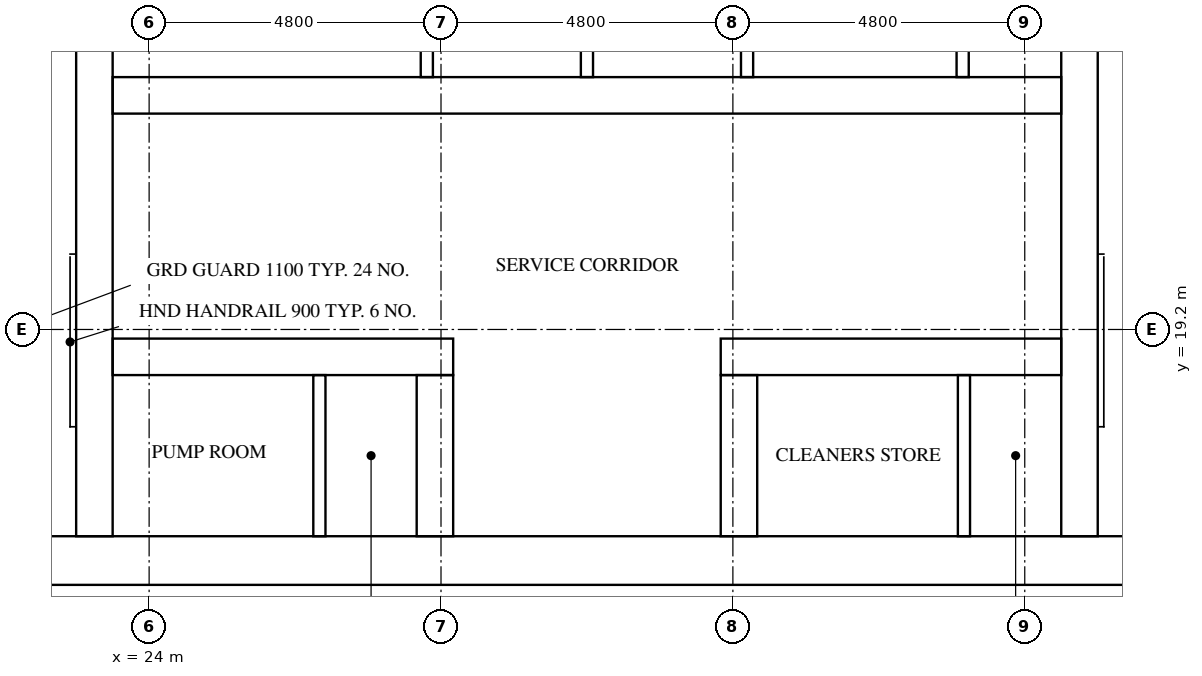
"""IFC4 building model, lengths in metres.
Left out: names, types, materials, properties, quantities, classifications, styles, units other than length and angle.
Written with IfcOpenShell. Run it as: python <this file> out.ifc"""

import sys

from ifc_helpers import new_model, si_unit, direction, frame, frame_2d, origin, place, context, subcontext, project, spatial, rectangle, extrude, element, fill, save


model = new_model("IFC4")
c1 = context("Model", 3, precision=1e-05, world=origin(), true_north=direction((0.0, 1.0)))
c2 = subcontext(c1, "Body", "Model", "MODEL_VIEW")
j1 = project(units=[si_unit("LENGTHUNIT", "METRE"), si_unit("PLANEANGLEUNIT", "RADIAN")], contexts=[c1])
p1 = place(None, origin())
s1 = spatial("IfcSite", under=j1, at=p1, CompositionType="ELEMENT")
p2 = place(p1, origin())
s2 = spatial("IfcBuilding", under=s1, at=p2, CompositionType="ELEMENT")
p3 = place(p2, frame((0.0, 0.0, 170.0)))
s3 = spatial("IfcBuildingStorey", under=s2, at=p3, CompositionType="ELEMENT", Elevation=170.0)
p4 = place(p3, frame((15.0, 15.4, 0.0), z_axis=(0.0, 0.0, 1.0), x_axis=(1.0, 0.0, 0.0)))
e1 = element("IfcWall", 1, at=p4, inside=s3, PredefinedType="SHEAR", context=c2, shape_type="SweptSolid", body=[
    extrude(rectangle(XDim=32.4, YDim=0.8, at=frame_2d((16.2, 0.0))), origin(), (0.0, 0.0, 1.0), 3.1),
])
p5 = place(p4, frame((15.3, 0.0, 0.0)))
e2 = element("IfcOpeningElement", 2, at=p5, cuts=e1, PredefinedType="OPENING", context=c2, shape_type="SweptSolid", body=[
    extrude(rectangle(XDim=1.8, YDim=2.1, at=frame_2d((0.9, 1.05))), frame((0.0, 0.41, 0.0), z_axis=(0.0, -1.0, 0.0), x_axis=(1.0, 0.0, 0.0)), (0.0, 0.0, 1.0), 0.82),
])
p6 = place(p3, frame((23.1, 15.8, 0.0), z_axis=(0.0, 0.0, 1.0), x_axis=(0.0, 1.0, 0.0)))
e3 = element("IfcWall", 3, at=p6, inside=s3, PredefinedType="SHEAR", context=c2, shape_type="SweptSolid", body=[
    extrude(rectangle(XDim=21.2, YDim=0.6, at=frame_2d((10.6, 0.0))), origin(), (0.0, 0.0, 1.0), 3.1),
])
p7 = place(p3, frame((39.3, 15.8, 0.0), z_axis=(0.0, 0.0, 1.0), x_axis=(0.0, 1.0, 0.0)))
e4 = element("IfcWall", 4, at=p7, inside=s3, PredefinedType="SHEAR", context=c2, shape_type="SweptSolid", body=[
    extrude(rectangle(XDim=8.45, YDim=0.6, at=frame_2d((4.225, 0.0))), origin(), (0.0, 0.0, 1.0), 3.1),
])
p8 = place(p3, frame((23.4, 18.75, 0.0), z_axis=(0.0, 0.0, 1.0), x_axis=(1.0, 0.0, 0.0)))
e5 = element("IfcWall", 5, at=p8, inside=s3, PredefinedType="SHEAR", context=c2, shape_type="SweptSolid", body=[
    extrude(rectangle(XDim=5.6, YDim=0.6, at=frame_2d((2.8, 0.0))), origin(), (0.0, 0.0, 1.0), 3.1),
])
p9 = place(p8, frame((1.15, 0.0, 0.0)))
e6 = element("IfcOpeningElement", 6, at=p9, cuts=e5, PredefinedType="OPENING", context=c2, shape_type="SweptSolid", body=[
    extrude(rectangle(XDim=1.0, YDim=2.1, at=frame_2d((0.5, 1.05))), frame((0.0, 0.31, 0.0), z_axis=(0.0, -1.0, 0.0), x_axis=(1.0, 0.0, 0.0)), (0.0, 0.0, 1.0), 0.62),
])
p10 = place(p8, frame((3.75, 0.0, 0.0)))
e7 = element("IfcOpeningElement", 7, at=p10, cuts=e5, PredefinedType="OPENING", context=c2, shape_type="SweptSolid", body=[
    extrude(rectangle(XDim=1.0, YDim=2.1, at=frame_2d((0.5, 1.05))), frame((0.0, 0.31, 0.0), z_axis=(0.0, -1.0, 0.0), x_axis=(1.0, 0.0, 0.0)), (0.0, 0.0, 1.0), 0.62),
])
p11 = place(p3, frame((33.4, 18.75, 0.0), z_axis=(0.0, 0.0, 1.0), x_axis=(1.0, 0.0, 0.0)))
e8 = element("IfcWall", 8, at=p11, inside=s3, PredefinedType="SHEAR", context=c2, shape_type="SweptSolid", body=[
    extrude(rectangle(XDim=5.6, YDim=0.6, at=frame_2d((2.8, 0.0))), origin(), (0.0, 0.0, 1.0), 3.1),
])
p12 = place(p11, frame((1.75, 0.0, 0.0)))
e9 = element("IfcOpeningElement", 9, at=p12, cuts=e8, PredefinedType="OPENING", context=c2, shape_type="SweptSolid", body=[
    extrude(rectangle(XDim=1.0, YDim=2.1, at=frame_2d((0.5, 1.05))), frame((0.0, 0.31, 0.0), z_axis=(0.0, -1.0, 0.0), x_axis=(1.0, 0.0, 0.0)), (0.0, 0.0, 1.0), 0.62),
])
p13 = place(p11, frame((4.35, 0.0, 0.0)))
e10 = element("IfcOpeningElement", 10, at=p13, cuts=e8, PredefinedType="OPENING", context=c2, shape_type="SweptSolid", body=[
    extrude(rectangle(XDim=1.0, YDim=2.1, at=frame_2d((0.5, 1.05))), frame((0.0, 0.31, 0.0), z_axis=(0.0, -1.0, 0.0), x_axis=(1.0, 0.0, 0.0)), (0.0, 0.0, 1.0), 0.62),
])
p14 = place(p3, frame((23.4, 23.05, 0.0), z_axis=(0.0, 0.0, 1.0), x_axis=(1.0, 0.0, 0.0)))
e11 = element("IfcWall", 11, at=p14, inside=s3, PredefinedType="SHEAR", context=c2, shape_type="SweptSolid", body=[
    extrude(rectangle(XDim=15.6, YDim=0.6, at=frame_2d((7.8, 0.0))), origin(), (0.0, 0.0, 1.0), 3.1),
])
p15 = place(p14, frame((2.033, 0.0, 0.0)))
e12 = element("IfcOpeningElement", 12, at=p15, cuts=e11, PredefinedType="OPENING", context=c2, shape_type="SweptSolid", body=[
    extrude(rectangle(XDim=1.0, YDim=2.1, at=frame_2d((0.5, 1.05))), frame((0.0, 0.31, 0.0), z_axis=(0.0, -1.0, 0.0), x_axis=(1.0, 0.0, 0.0)), (0.0, 0.0, 1.0), 0.62),
])
p16 = place(p14, frame((11.706, 0.0, 0.0)))
e13 = element("IfcOpeningElement", 13, at=p16, cuts=e11, PredefinedType="OPENING", context=c2, shape_type="SweptSolid", body=[
    extrude(rectangle(XDim=1.0, YDim=2.1, at=frame_2d((0.5, 1.05))), frame((0.0, 0.31, 0.0), z_axis=(0.0, -1.0, 0.0), x_axis=(1.0, 0.0, 0.0)), (0.0, 0.0, 1.0), 0.62),
])
p17 = place(p14, frame((14.339, 0.0, 0.0)))
e14 = element("IfcOpeningElement", 14, at=p17, cuts=e11, PredefinedType="OPENING", context=c2, shape_type="SweptSolid", body=[
    extrude(rectangle(XDim=1.0, YDim=2.1, at=frame_2d((0.5, 1.05))), frame((0.0, 0.31, 0.0), z_axis=(0.0, -1.0, 0.0), x_axis=(1.0, 0.0, 0.0)), (0.0, 0.0, 1.0), 0.62),
])
for number, where, z_axis, x_axis in (
    (15, (28.7, 15.8, 0.0), (0.0, 0.0, 1.0), (0.0, 1.0, 0.0)),
    (16, (33.7, 15.8, 0.0), (0.0, 0.0, 1.0), (0.0, 1.0, 0.0)),
):
    element("IfcWall", number, at=place(p3, frame(where, z_axis=z_axis, x_axis=x_axis)), inside=s3, PredefinedType="SHEAR", context=c2, shape_type="SweptSolid", body=[
        extrude(rectangle(XDim=2.65, YDim=0.6, at=frame_2d((1.325, 0.0))), origin(), (0.0, 0.0, 1.0), 3.1),
    ])
for number, where, z_axis, x_axis in (
    (17, (28.567, 23.35, 0.0), (0.0, 0.0, 1.0), (0.0, 1.0, 0.0)),
    (18, (31.2, 23.35, 0.0), (0.0, 0.0, 1.0), (0.0, 1.0, 0.0)),
    (19, (33.833, 23.35, 0.0), (0.0, 0.0, 1.0), (0.0, 1.0, 0.0)),
):
    element("IfcWall", number, at=place(p3, frame(where, z_axis=z_axis, x_axis=x_axis)), inside=s3, PredefinedType="SOLIDWALL", context=c2, shape_type="SweptSolid", body=[
        extrude(rectangle(XDim=2.5, YDim=0.2, at=frame_2d((1.25, 0.0))), origin(), (0.0, 0.0, 1.0), 3.1),
    ])
p18 = place(p3, frame((37.379, 23.35, 0.0), z_axis=(0.0, 0.0, 1.0), x_axis=(0.0, 1.0, 0.0)))
e20 = element("IfcWall", 20, at=p18, inside=s3, PredefinedType="PARTITIONING", context=c2, shape_type="SweptSolid", body=[
    extrude(rectangle(XDim=2.5, YDim=0.2, at=frame_2d((1.25, 0.0))), origin(), (0.0, 0.0, 1.0), 3.1),
])
for number, where, z_axis, x_axis in (
    (21, (26.8, 15.8, 0.0), (0.0, 0.0, 1.0), (0.0, 1.0, 0.0)),
    (22, (37.4, 15.8, 0.0), (0.0, 0.0, 1.0), (0.0, 1.0, 0.0)),
):
    element("IfcWall", number, at=place(p3, frame(where, z_axis=z_axis, x_axis=x_axis)), inside=s3, PredefinedType="PARTITIONING", context=c2, shape_type="SweptSolid", body=[
        extrude(rectangle(XDim=2.65, YDim=0.2, at=frame_2d((1.325, 0.0))), origin(), (0.0, 0.0, 1.0), 3.1),
    ])
p19 = place(p5, frame((1.8, 0.0, 0.0), z_axis=(0.0, 0.0, 1.0), x_axis=(-1.0, 0.0, 0.0)))
e23 = element("IfcDoor", 23, at=p19, inside=s3, OperationType="DOUBLE_DOOR_SINGLE_SWING", PredefinedType="DOOR", context=c2, shape_type="SweptSolid", body=[
    extrude(rectangle(XDim=1.8, YDim=2.1, at=frame_2d((0.9, 1.05))), frame((0.0, 0.025, 0.0), z_axis=(0.0, -1.0, 0.0), x_axis=(1.0, 0.0, 0.0)), (0.0, 0.0, 1.0), 0.05),
])
fill(e2, e23)
p20 = place(p15, frame((1.0, 0.0, 0.0), z_axis=(0.0, 0.0, 1.0), x_axis=(-1.0, 0.0, 0.0)))
e24 = element("IfcDoor", 24, at=p20, inside=s3, OperationType="SINGLE_SWING_LEFT", PredefinedType="DOOR", context=c2, shape_type="SweptSolid", body=[
    extrude(rectangle(XDim=1.0, YDim=2.1, at=frame_2d((0.5, 1.05))), frame((0.0, 0.025, 0.0), z_axis=(0.0, -1.0, 0.0), x_axis=(1.0, 0.0, 0.0)), (0.0, 0.0, 1.0), 0.05),
])
fill(e12, e24)
p21 = place(p16, frame((1.0, 0.0, 0.0), z_axis=(0.0, 0.0, 1.0), x_axis=(-1.0, 0.0, 0.0)))
e25 = element("IfcDoor", 25, at=p21, inside=s3, OperationType="SINGLE_SWING_RIGHT", PredefinedType="DOOR", context=c2, shape_type="SweptSolid", body=[
    extrude(rectangle(XDim=1.0, YDim=2.1, at=frame_2d((0.5, 1.05))), frame((0.0, 0.025, 0.0), z_axis=(0.0, -1.0, 0.0), x_axis=(1.0, 0.0, 0.0)), (0.0, 0.0, 1.0), 0.05),
])
fill(e13, e25)
p22 = place(p17, frame((1.0, 0.0, 0.0), z_axis=(0.0, 0.0, 1.0), x_axis=(-1.0, 0.0, 0.0)))
e26 = element("IfcDoor", 26, at=p22, inside=s3, OperationType="SINGLE_SWING_LEFT", PredefinedType="DOOR", context=c2, shape_type="SweptSolid", body=[
    extrude(rectangle(XDim=1.0, YDim=2.1, at=frame_2d((0.5, 1.05))), frame((0.0, 0.025, 0.0), z_axis=(0.0, -1.0, 0.0), x_axis=(1.0, 0.0, 0.0)), (0.0, 0.0, 1.0), 0.05),
])
fill(e14, e26)
p23 = place(p9, origin())
e27 = element("IfcDoor", 27, at=p23, inside=s3, OperationType="SINGLE_SWING_RIGHT", PredefinedType="DOOR", context=c2, shape_type="SweptSolid", body=[
    extrude(rectangle(XDim=1.0, YDim=2.1, at=frame_2d((0.5, 1.05))), frame((0.0, 0.025, 0.0), z_axis=(0.0, -1.0, 0.0), x_axis=(1.0, 0.0, 0.0)), (0.0, 0.0, 1.0), 0.05),
])
fill(e6, e27)
p24 = place(p10, origin())
e28 = element("IfcDoor", 28, at=p24, inside=s3, OperationType="SINGLE_SWING_LEFT", PredefinedType="DOOR", context=c2, shape_type="SweptSolid", body=[
    extrude(rectangle(XDim=1.0, YDim=2.1, at=frame_2d((0.5, 1.05))), frame((0.0, 0.025, 0.0), z_axis=(0.0, -1.0, 0.0), x_axis=(1.0, 0.0, 0.0)), (0.0, 0.0, 1.0), 0.05),
])
fill(e7, e28)
p25 = place(p12, origin())
e29 = element("IfcDoor", 29, at=p25, inside=s3, OperationType="SINGLE_SWING_RIGHT", PredefinedType="DOOR", context=c2, shape_type="SweptSolid", body=[
    extrude(rectangle(XDim=1.0, YDim=2.1, at=frame_2d((0.5, 1.05))), frame((0.0, 0.025, 0.0), z_axis=(0.0, -1.0, 0.0), x_axis=(1.0, 0.0, 0.0)), (0.0, 0.0, 1.0), 0.05),
])
fill(e9, e29)
p26 = place(p13, origin())
e30 = element("IfcDoor", 30, at=p26, inside=s3, OperationType="SINGLE_SWING_LEFT", PredefinedType="DOOR", context=c2, shape_type="SweptSolid", body=[
    extrude(rectangle(XDim=1.0, YDim=2.1, at=frame_2d((0.5, 1.05))), frame((0.0, 0.025, 0.0), z_axis=(0.0, -1.0, 0.0), x_axis=(1.0, 0.0, 0.0)), (0.0, 0.0, 1.0), 0.05),
])
fill(e10, e30)
save(model, sys.argv[1])
